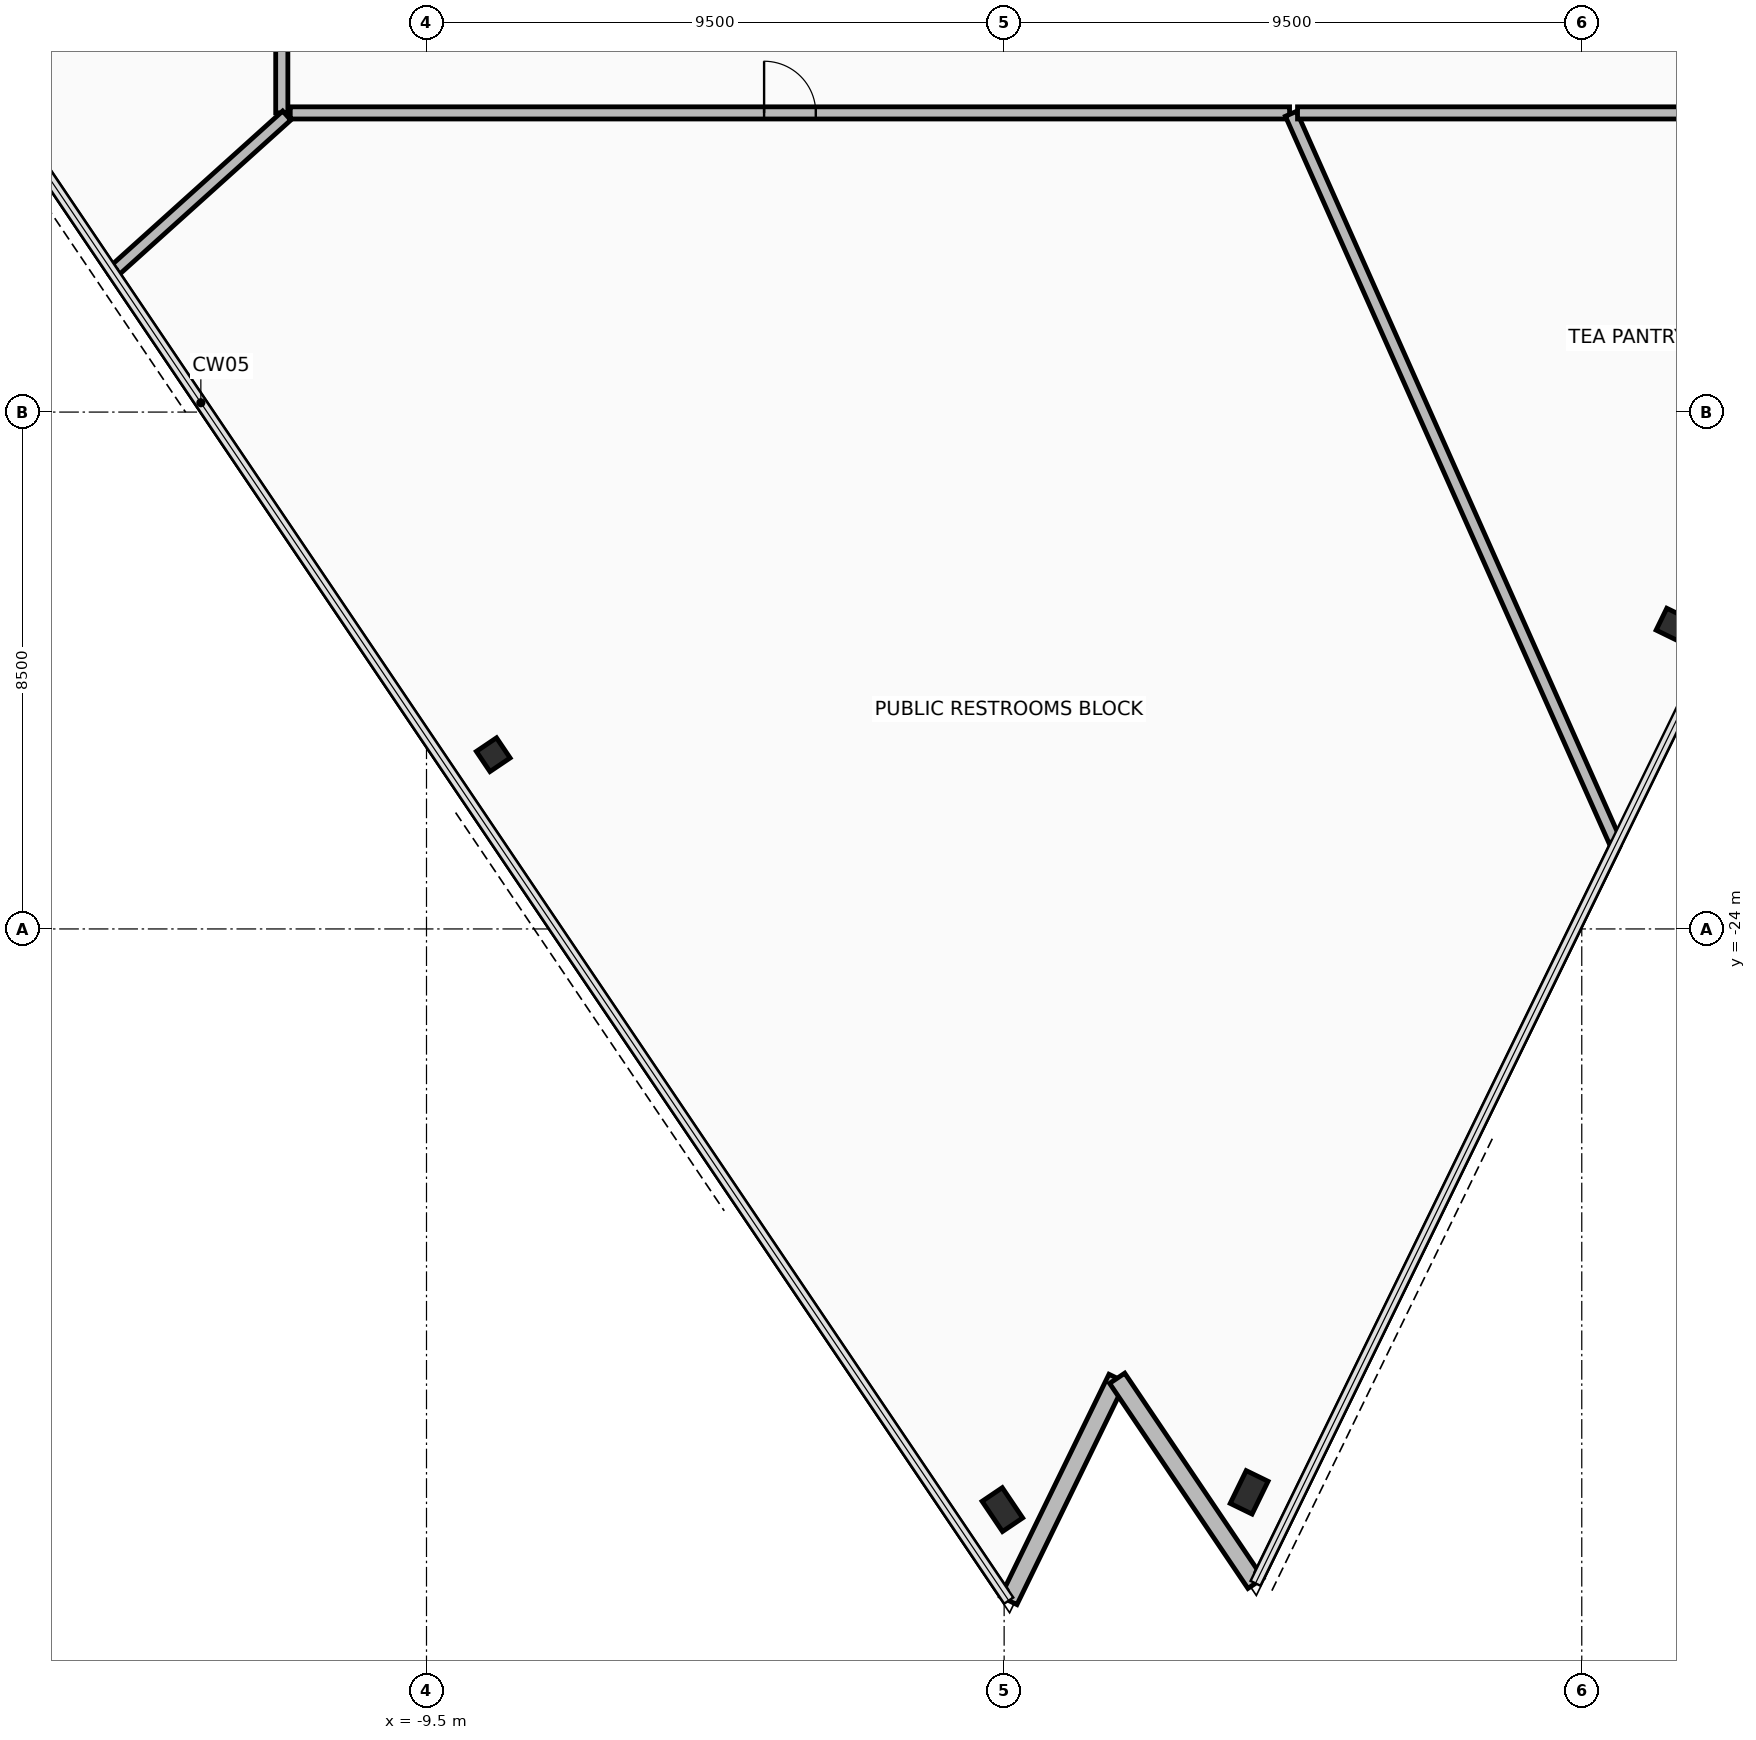
"""IFC4 building model, lengths in metres.
Left out: names, types, materials, properties, quantities, classifications, styles, units other than length and angle.
Written with IfcOpenShell. Run it as: python <this file> out.ifc"""

import sys

from ifc_helpers import new_model, si_unit, direction, frame, frame_2d, origin, origin_2d, place, context, subcontext, project, spatial, rectangle, hollow_rectangle, extrude, element, fill, save


model = new_model("IFC4")
c1 = context("Model", 3, precision=1e-05, world=origin(), true_north=direction((0.0, 1.0)))
c2 = subcontext(c1, "Body", "Model", "MODEL_VIEW")
j1 = project(units=[si_unit("LENGTHUNIT", "METRE"), si_unit("PLANEANGLEUNIT", "RADIAN")], contexts=[c1])
p1 = place(None, origin())
s1 = spatial("IfcSite", under=j1, at=p1, CompositionType="ELEMENT")
p2 = place(p1, origin())
s2 = spatial("IfcBuilding", under=s1, at=p2, CompositionType="ELEMENT")
p3 = place(p2, frame((0.0, 0.0, 271.4)))
s3 = spatial("IfcBuildingStorey", under=s2, at=p3, CompositionType="ELEMENT", Elevation=271.4)
p4 = place(p3, frame((-8.402, -21.135, 0.0), z_axis=(0.0, 0.0, 1.0), x_axis=(-0.559192903471, 0.829037572555, 0.0)))
e1 = element("IfcColumn", 1, at=p4, inside=s3, PredefinedType="COLUMN", context=c2, shape_type="SweptSolid", body=[
    extrude(hollow_rectangle(XDim=0.4, YDim=0.4, WallThickness=0.025, at=origin_2d()), origin(), (0.0, 0.0, 1.0), 3.6),
])
for number, where, z_axis, x_axis in (
    (2, (-0.029, -33.549, 0.0), (0.0, 0.0, 1.0), (-0.559, 0.829, 0.0)),
    (3, (4.029, -33.265, 0.0), (0.0, 0.0, 1.0), (0.438, 0.899, 0.0)),
):
    element("IfcColumn", number, at=place(p3, frame(where, z_axis=z_axis, x_axis=x_axis)), inside=s3, PredefinedType="COLUMN", context=c2, shape_type="SweptSolid", body=[
        extrude(hollow_rectangle(XDim=0.4, YDim=0.6, WallThickness=0.03, at=origin_2d()), origin(), (0.0, 0.0, 1.0), 3.6),
    ])
p5 = place(p3, frame((10.99, -18.994, 0.0), z_axis=(0.0, 0.0, 1.0), x_axis=(0.43837271548, 0.898793281196, 0.0)))
e4 = element("IfcColumn", 4, at=p5, inside=s3, PredefinedType="COLUMN", context=c2, shape_type="SweptSolid", body=[
    extrude(hollow_rectangle(XDim=0.4, YDim=0.4, WallThickness=0.025, at=origin_2d()), origin(), (0.0, 0.0, 1.0), 3.6),
])
p6 = place(p3, frame((0.076, -35.045, 0.0), z_axis=(0.0, 0.0, 1.0), x_axis=(0.438357414153, 0.898800744024, 0.0)))
e5 = element("IfcWall", 5, at=p6, inside=s3, PredefinedType="STANDARD", context=c2, shape_type="SweptSolid", body=[
    extrude(rectangle(XDim=4.068, YDim=0.3, at=frame_2d((2.034, 0.0))), origin(), (0.0, 0.0, 1.0), 2.765),
])
p7 = place(p3, frame((1.859, -31.389, 0.0), z_axis=(0.0, 0.0, 1.0), x_axis=(0.559206900681, -0.829028131145, 0.0)))
e6 = element("IfcWall", 6, at=p7, inside=s3, PredefinedType="STANDARD", context=c2, shape_type="SweptSolid", body=[
    extrude(rectangle(XDim=4.068, YDim=0.3, at=frame_2d((2.034, 0.0))), origin(), (0.0, 0.0, 1.0), 2.765),
])
p8 = place(p3, frame((-11.88, 6.844, 0.0), z_axis=(0.0, 0.0, 1.0), x_axis=(0.0, -1.0, 0.0)))
e7 = element("IfcWall", 7, at=p8, inside=s3, PredefinedType="PARTITIONING", context=c2, shape_type="SweptSolid", body=[
    extrude(rectangle(XDim=17.424, YDim=0.2, at=frame_2d((8.712, 0.0))), origin(), (0.0, 0.0, 1.0), 2.915),
])
p9 = place(p8, frame((8.287, 0.0, 0.0)))
e8 = element("IfcOpeningElement", 8, at=p9, cuts=e7, PredefinedType="OPENING", context=c2, shape_type="SweptSolid", body=[
    extrude(rectangle(XDim=0.85, YDim=2.1, at=frame_2d((0.425, 1.05))), frame((0.0, 0.11, 0.0), z_axis=(0.0, -1.0, 0.0), x_axis=(1.0, 0.0, 0.0)), (0.0, 0.0, 1.0), 0.22),
])
p10 = place(p3, frame((-11.799, -10.624, 0.0), z_axis=(0.0, 0.0, 1.0), x_axis=(-0.743135262532, -0.669141226933, 0.0)))
e9 = element("IfcWall", 9, at=p10, inside=s3, PredefinedType="PARTITIONING", context=c2, shape_type="SweptSolid", body=[
    extrude(rectangle(XDim=3.821, YDim=0.2, at=frame_2d((1.91, 0.0))), origin(), (0.0, 0.0, 1.0), 2.765),
])
p11 = place(p3, frame((-14.676, -13.176, 0.0), z_axis=(0.0, 0.0, 1.0), x_axis=(-0.559188394736, 0.829040613717, 0.0)))
e10 = element("IfcWall", 10, at=p11, inside=s3, PredefinedType="PARTITIONING", context=c2, shape_type="SweptSolid", body=[
    extrude(rectangle(XDim=20.963, YDim=0.15, at=frame_2d((10.482, 0.0))), origin(), (0.0, 0.0, 1.0), 3.42),
])
p12 = place(p3, frame((-0.024, -34.897, 0.0), z_axis=(0.0, 0.0, 1.0), x_axis=(-0.559190617233, 0.829039114637, 0.0)))
e11 = element("IfcWall", 11, at=p12, inside=s3, PredefinedType="PARTITIONING", context=c2, shape_type="SweptSolid", body=[
    extrude(rectangle(XDim=26.15, YDim=0.15, at=frame_2d((13.075, 0.0))), origin(), (0.0, 0.0, 1.0), 3.42),
])
p13 = place(p3, frame((-11.741, -10.58, 0.0), z_axis=(0.0, 0.0, 1.0), x_axis=(1.0, 0.0, 0.0)))
e12 = element("IfcWall", 12, at=p13, inside=s3, PredefinedType="PARTITIONING", context=c2, shape_type="SweptSolid", body=[
    extrude(rectangle(XDim=16.435, YDim=0.2, at=frame_2d((8.218, 0.0))), origin(), (0.0, 0.0, 1.0), 2.915),
])
p14 = place(p13, frame((7.793, 0.0, 0.0)))
e13 = element("IfcOpeningElement", 13, at=p14, cuts=e12, PredefinedType="OPENING", context=c2, shape_type="SweptSolid", body=[
    extrude(rectangle(XDim=0.85, YDim=2.1, at=frame_2d((0.425, 1.05))), frame((0.0, 0.11, 0.0), z_axis=(0.0, -1.0, 0.0), x_axis=(1.0, 0.0, 0.0)), (0.0, 0.0, 1.0), 0.22),
])
p15 = place(p3, frame((4.717, -10.595, 0.0), z_axis=(0.0, 0.0, 1.0), x_axis=(0.406740308305, -0.913543825769, 0.0)))
e14 = element("IfcWall", 14, at=p15, inside=s3, PredefinedType="PARTITIONING", context=c2, shape_type="SweptSolid", body=[
    extrude(rectangle(XDim=13.134, YDim=0.2, at=frame_2d((6.567, 0.0))), origin(), (0.0, 0.0, 1.0), 2.765),
])
p16 = place(p3, frame((10.059, -22.614, 0.0), z_axis=(0.0, 0.0, 1.0), x_axis=(-0.438368087018, -0.898795538643, 0.0)))
e15 = element("IfcWall", 15, at=p16, inside=s3, PredefinedType="PARTITIONING", context=c2, shape_type="SweptSolid", body=[
    extrude(rectangle(XDim=13.336, YDim=0.15, at=frame_2d((6.668, 0.0))), origin(), (0.0, 0.0, 1.0), 3.42),
])
p17 = place(p3, frame((4.825, -10.58, 0.0), z_axis=(0.0, 0.0, 1.0), x_axis=(1.0, 0.0, 0.0)))
e16 = element("IfcWall", 16, at=p17, inside=s3, PredefinedType="PARTITIONING", context=c2, shape_type="SweptSolid", body=[
    extrude(rectangle(XDim=7.054, YDim=0.2, at=frame_2d((3.527, 0.0))), origin(), (0.0, 0.0, 1.0), 2.915),
])
p18 = place(p14, origin())
e17 = element("IfcDoor", 17, at=p18, inside=s3, OperationType="SINGLE_SWING_RIGHT", PredefinedType="DOOR", context=c2, shape_type="SweptSolid", body=[
    extrude(rectangle(XDim=0.85, YDim=2.1, at=frame_2d((0.425, 1.05))), frame((0.0, 0.025, 0.0), z_axis=(0.0, -1.0, 0.0), x_axis=(1.0, 0.0, 0.0)), (0.0, 0.0, 1.0), 0.05),
])
fill(e13, e17)
save(model, sys.argv[1])
